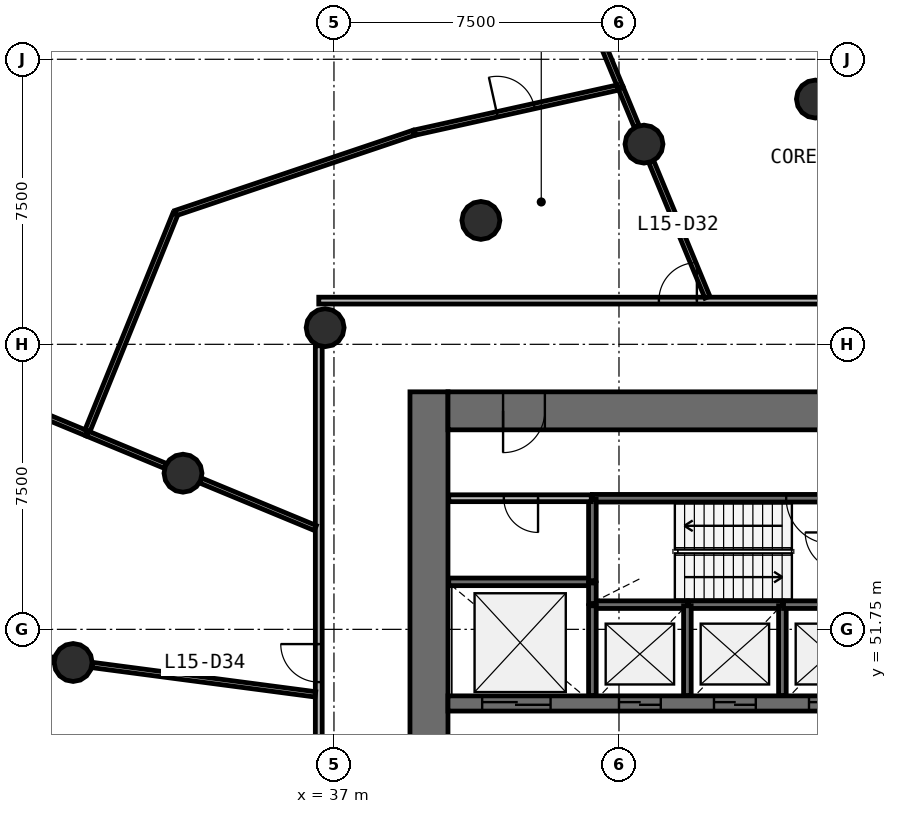
"""IFC4 building model, lengths in metres.
Left out: names, types, materials, properties, quantities, classifications, styles, units other than length and angle.
Written with IfcOpenShell. Run it as: python <this file> out.ifc"""

import sys

from ifc_helpers import new_model, si_unit, direction, frame, frame_2d, origin, origin_2d, place, context, subcontext, project, spatial, rectangle, circle, extrude, source, transform, mapped, element, fill, save


model = new_model("IFC4")
c1 = context("Model", 3, precision=1e-05, world=origin(), true_north=direction((0.0, 1.0)))
c2 = subcontext(c1, "Body", "Model", "MODEL_VIEW")
j1 = project(units=[si_unit("LENGTHUNIT", "METRE"), si_unit("PLANEANGLEUNIT", "RADIAN")], contexts=[c1])
p1 = place(None, origin())
s1 = spatial("IfcSite", under=j1, at=p1, CompositionType="ELEMENT")
p2 = place(p1, origin())
s2 = spatial("IfcBuilding", under=s1, at=p2, CompositionType="ELEMENT")
p3 = place(p2, frame((0.0, 0.0, 66.6)))
s3 = spatial("IfcBuildingStorey", under=s2, at=p3, CompositionType="ELEMENT", Elevation=66.6)
p4 = place(p3, frame((39.5, 58.0, 0.0), z_axis=(0.0, 0.0, 1.0), x_axis=(0.0, -1.0, 0.0)))
e1 = element("IfcWall", 1, at=p4, inside=s3, PredefinedType="SHEAR", context=c2, shape_type="SweptSolid", body=[
    extrude(rectangle(XDim=20.0, YDim=1.0, at=frame_2d((10.0, 0.0))), origin(), (0.0, 0.0, 1.0), 4.4),
])
p5 = place(p4, frame((9.1, 0.0, 0.0)))
e2 = element("IfcOpeningElement", 2, at=p5, cuts=e1, PredefinedType="OPENING", context=c2, shape_type="SweptSolid", body=[
    extrude(rectangle(XDim=1.8, YDim=2.1, at=frame_2d((0.9, 1.05))), frame((0.0, 0.51, 0.0), z_axis=(0.0, -1.0, 0.0), x_axis=(1.0, 0.0, 0.0)), (0.0, 0.0, 1.0), 1.02),
])
p6 = place(p3, frame((64.0, 57.5, 0.0), z_axis=(0.0, 0.0, 1.0), x_axis=(-1.0, 0.0, 0.0)))
e3 = element("IfcWall", 3, at=p6, inside=s3, PredefinedType="SHEAR", context=c2, shape_type="SweptSolid", body=[
    extrude(rectangle(XDim=24.0, YDim=1.0, at=frame_2d((12.0, 0.0))), origin(), (0.0, 0.0, 1.0), 4.4),
])
p7 = place(p6, frame((21.45, 0.0, 0.0)))
e4 = element("IfcOpeningElement", 4, at=p7, cuts=e3, PredefinedType="OPENING", context=c2, shape_type="SweptSolid", body=[
    extrude(rectangle(XDim=1.1, YDim=2.1, at=frame_2d((0.55, 1.05))), frame((0.0, 0.51, 0.0), z_axis=(0.0, -1.0, 0.0), x_axis=(1.0, 0.0, 0.0)), (0.0, 0.0, 1.0), 1.02),
])
p8 = place(p6, frame((1.95, 0.0, 0.0)))
e5 = element("IfcOpeningElement", 5, at=p8, cuts=e3, PredefinedType="OPENING", context=c2, shape_type="SweptSolid", body=[
    extrude(rectangle(XDim=1.1, YDim=2.1, at=frame_2d((0.55, 1.05))), frame((0.0, 0.51, 0.0), z_axis=(0.0, -1.0, 0.0), x_axis=(1.0, 0.0, 0.0)), (0.0, 0.0, 1.0), 1.02),
])
p9 = place(p3, frame((40.0, 49.8, 0.0), z_axis=(0.0, 0.0, 1.0), x_axis=(1.0, 0.0, 0.0)))
e6 = element("IfcWall", 6, at=p9, inside=s3, PredefinedType="SHEAR", context=c2, shape_type="SweptSolid", body=[
    extrude(rectangle(XDim=24.0, YDim=0.4, at=frame_2d((12.0, 0.0))), origin(), (0.0, 0.0, 1.0), 4.4),
])
p10 = place(p9, frame((4.5, 0.0, 0.0)))
e7 = element("IfcOpeningElement", 7, at=p10, cuts=e6, PredefinedType="OPENING", context=c2, shape_type="SweptSolid", body=[
    extrude(rectangle(XDim=1.1, YDim=2.1, at=frame_2d((0.55, 1.05))), frame((0.0, 0.21, 0.0), z_axis=(0.0, -1.0, 0.0), x_axis=(1.0, 0.0, 0.0)), (0.0, 0.0, 1.0), 0.42),
])
p11 = place(p9, frame((7.0, 0.0, 0.0)))
e8 = element("IfcOpeningElement", 8, at=p11, cuts=e6, PredefinedType="OPENING", context=c2, shape_type="SweptSolid", body=[
    extrude(rectangle(XDim=1.1, YDim=2.1, at=frame_2d((0.55, 1.05))), frame((0.0, 0.21, 0.0), z_axis=(0.0, -1.0, 0.0), x_axis=(1.0, 0.0, 0.0)), (0.0, 0.0, 1.0), 0.42),
])
p12 = place(p9, frame((9.5, 0.0, 0.0)))
e9 = element("IfcOpeningElement", 9, at=p12, cuts=e6, PredefinedType="OPENING", context=c2, shape_type="SweptSolid", body=[
    extrude(rectangle(XDim=1.1, YDim=2.1, at=frame_2d((0.55, 1.05))), frame((0.0, 0.21, 0.0), z_axis=(0.0, -1.0, 0.0), x_axis=(1.0, 0.0, 0.0)), (0.0, 0.0, 1.0), 0.42),
])
p13 = place(p9, frame((0.9, 0.0, 0.0)))
e10 = element("IfcOpeningElement", 10, at=p13, cuts=e6, PredefinedType="OPENING", context=c2, shape_type="SweptSolid", body=[
    extrude(rectangle(XDim=1.8, YDim=2.4, at=frame_2d((0.9, 1.2))), frame((0.0, 0.21, 0.0), z_axis=(0.0, -1.0, 0.0), x_axis=(1.0, 0.0, 0.0)), (0.0, 0.0, 1.0), 0.42),
])
p14 = place(p9, frame((20.45, 0.0, 0.0)))
e11 = element("IfcOpeningElement", 11, at=p14, cuts=e6, PredefinedType="OPENING", context=c2, shape_type="SweptSolid", body=[
    extrude(rectangle(XDim=0.9, YDim=2.1, at=frame_2d((0.45, 1.05))), frame((0.0, 0.21, 0.0), z_axis=(0.0, -1.0, 0.0), x_axis=(1.0, 0.0, 0.0)), (0.0, 0.0, 1.0), 0.42),
])
p15 = place(p9, frame((22.25, 0.0, 0.0)))
e12 = element("IfcOpeningElement", 12, at=p15, cuts=e6, PredefinedType="OPENING", context=c2, shape_type="SweptSolid", body=[
    extrude(rectangle(XDim=0.9, YDim=2.1, at=frame_2d((0.45, 1.05))), frame((0.0, 0.21, 0.0), z_axis=(0.0, -1.0, 0.0), x_axis=(1.0, 0.0, 0.0)), (0.0, 0.0, 1.0), 0.42),
])
p16 = place(p9, frame((11.65, 0.0, 0.0)))
e13 = element("IfcOpeningElement", 13, at=p16, cuts=e6, PredefinedType="OPENING", context=c2, shape_type="SweptSolid", body=[
    extrude(rectangle(XDim=0.9, YDim=2.1, at=frame_2d((0.45, 1.05))), frame((0.0, 0.21, 0.0), z_axis=(0.0, -1.0, 0.0), x_axis=(1.0, 0.0, 0.0)), (0.0, 0.0, 1.0), 0.42),
])
m1 = source(origin(), c2, "Body", "SweptSolid", [
    extrude(circle(Radius=0.5, at=origin_2d()), origin(), (0.0, 0.0, 1.0), 4.4),
])
for number, where, z_axis, x_axis in (
    (14, (49.669, 65.703, 0.0), (0.0, 0.0, 1.0), (1.0, 0.0, 0.0)),
    (15, (45.158, 64.518, 0.0), (0.0, 0.0, 1.0), (1.0, 0.0, 0.0)),
    (16, (40.866, 62.51, 0.0), (0.0, 0.0, 1.0), (1.0, 0.0, 0.0)),
    (17, (36.768, 59.688, 0.0), (0.0, 0.0, 1.0), (1.0, 0.0, 0.0)),
    (18, (33.028, 55.859, 0.0), (0.0, 0.0, 1.0), (1.0, 0.0, 0.0)),
    (19, (30.137, 50.878, 0.0), (0.0, 0.0, 1.0), (1.0, 0.0, 0.0)),
):
    element("IfcColumn", number, at=place(p3, frame(where, z_axis=z_axis, x_axis=x_axis)), inside=s3, PredefinedType="COLUMN", context=c2, shape_type="MappedRepresentation", body=[
        mapped(m1, transform((0.0, 0.0, 0.0), scale=1.0)),
    ])
p17 = place(p3, frame((50.4, 55.2, 0.0), z_axis=(0.0, 0.0, 1.0), x_axis=(-1.0, 0.0, 0.0)))
e20 = element("IfcWall", 20, at=p17, inside=s3, PredefinedType="SOLIDWALL", context=c2, shape_type="SweptSolid", body=[
    extrude(rectangle(XDim=6.6, YDim=0.2, at=frame_2d((3.3, 0.0))), origin(), (0.0, 0.0, 1.0), 3.95),
])
p18 = place(p17, frame((0.3, 0.0, 0.0)))
e21 = element("IfcOpeningElement", 21, at=p18, cuts=e20, PredefinedType="OPENING", context=c2, shape_type="SweptSolid", body=[
    extrude(rectangle(XDim=1.2, YDim=2.1, at=frame_2d((0.6, 1.05))), frame((0.0, 0.11, 0.0), z_axis=(0.0, -1.0, 0.0), x_axis=(1.0, 0.0, 0.0)), (0.0, 0.0, 1.0), 0.22),
])
p19 = place(p3, frame((43.8, 53.0, 0.0), z_axis=(0.0, 0.0, 1.0), x_axis=(-1.0, 0.0, 0.0)))
e22 = element("IfcWall", 22, at=p19, inside=s3, PredefinedType="SOLIDWALL", context=c2, shape_type="SweptSolid", body=[
    extrude(rectangle(XDim=3.78, YDim=0.2, at=frame_2d((1.89, 0.0))), origin(), (0.0, 0.0, 1.0), 3.95),
])
p20 = place(p3, frame((46.3, 52.4, 0.0), z_axis=(0.0, 0.0, 1.0), x_axis=(-1.0, 0.0, 0.0)))
e23 = element("IfcWall", 23, at=p20, inside=s3, PredefinedType="SOLIDWALL", context=c2, shape_type="SweptSolid", body=[
    extrude(rectangle(XDim=2.5, YDim=0.2, at=frame_2d((1.25, 0.0))), origin(), (0.0, 0.0, 1.0), 3.95),
])
p21 = place(p3, frame((48.8, 52.4, 0.0), z_axis=(0.0, 0.0, 1.0), x_axis=(-1.0, 0.0, 0.0)))
e24 = element("IfcWall", 24, at=p21, inside=s3, PredefinedType="SOLIDWALL", context=c2, shape_type="SweptSolid", body=[
    extrude(rectangle(XDim=2.47, YDim=0.2, at=frame_2d((1.235, 0.0))), origin(), (0.0, 0.0, 1.0), 3.95),
])
for number, where, z_axis, x_axis in (
    (25, (43.8, 52.37, 0.0), (0.0, 0.0, 1.0), (0.0, -1.0, 0.0)),
    (26, (46.3, 50.01, 0.0), (0.0, 0.0, 1.0), (0.0, 1.0, 0.0)),
    (27, (48.8, 50.01, 0.0), (0.0, 0.0, 1.0), (0.0, 1.0, 0.0)),
):
    element("IfcWall", number, at=place(p3, frame(where, z_axis=z_axis, x_axis=x_axis)), inside=s3, PredefinedType="SOLIDWALL", context=c2, shape_type="SweptSolid", body=[
        extrude(rectangle(XDim=2.36, YDim=0.2, at=frame_2d((1.18, 0.0))), origin(), (0.0, 0.0, 1.0), 3.95),
    ])
p22 = place(p3, frame((43.8, 55.17, 0.0), z_axis=(0.0, 0.0, 1.0), x_axis=(0.0, -1.0, 0.0)))
e28 = element("IfcWall", 28, at=p22, inside=s3, PredefinedType="SOLIDWALL", context=c2, shape_type="SweptSolid", body=[
    extrude(rectangle(XDim=2.14, YDim=0.2, at=frame_2d((1.07, 0.0))), origin(), (0.0, 0.0, 1.0), 3.95),
])
p23 = place(p3, frame((50.37, 52.4, 0.0), z_axis=(0.0, 0.0, 1.0), x_axis=(-1.0, 0.0, 0.0)))
e29 = element("IfcWall", 29, at=p23, inside=s3, PredefinedType="SOLIDWALL", context=c2, shape_type="SweptSolid", body=[
    extrude(rectangle(XDim=1.54, YDim=0.2, at=frame_2d((0.77, 0.0))), origin(), (0.0, 0.0, 1.0), 3.95),
])
p24 = place(p3, frame((43.8, 52.43, 0.0), z_axis=(0.0, 0.0, 1.0), x_axis=(0.0, 1.0, 0.0)))
e30 = element("IfcWall", 30, at=p24, inside=s3, PredefinedType="SOLIDWALL", context=c2, shape_type="SweptSolid", body=[
    extrude(rectangle(XDim=0.54, YDim=0.2, at=frame_2d((0.27, 0.0))), origin(), (0.0, 0.0, 1.0), 3.95),
])
p25 = place(p3, frame((36.6, 60.4, 0.0), z_axis=(0.0, 0.0, 1.0), x_axis=(1.0, 0.0, 0.0)))
e31 = element("IfcWall", 31, at=p25, inside=s3, PredefinedType="PARTITIONING", context=c2, shape_type="SweptSolid", body=[
    extrude(rectangle(XDim=30.8, YDim=0.18, at=frame_2d((15.4, 0.0))), origin(), (0.0, 0.0, 1.0), 3.05),
])
p26 = place(p25, frame((17.35, 0.0, 0.0)))
e32 = element("IfcOpeningElement", 32, at=p26, cuts=e31, PredefinedType="OPENING", context=c2, shape_type="SweptSolid", body=[
    extrude(rectangle(XDim=1.0, YDim=2.1, at=frame_2d((0.5, 1.05))), frame((0.0, 0.1, 0.0), z_axis=(0.0, -1.0, 0.0), x_axis=(1.0, 0.0, 0.0)), (0.0, 0.0, 1.0), 0.2),
])
p27 = place(p25, frame((14.95, 0.0, 0.0)))
e33 = element("IfcOpeningElement", 33, at=p27, cuts=e31, PredefinedType="OPENING", context=c2, shape_type="SweptSolid", body=[
    extrude(rectangle(XDim=1.0, YDim=2.1, at=frame_2d((0.5, 1.05))), frame((0.0, 0.1, 0.0), z_axis=(0.0, -1.0, 0.0), x_axis=(1.0, 0.0, 0.0)), (0.0, 0.0, 1.0), 0.2),
])
p28 = place(p25, frame((8.95, 0.0, 0.0)))
e34 = element("IfcOpeningElement", 34, at=p28, cuts=e31, PredefinedType="OPENING", context=c2, shape_type="SweptSolid", body=[
    extrude(rectangle(XDim=1.0, YDim=2.1, at=frame_2d((0.5, 1.05))), frame((0.0, 0.1, 0.0), z_axis=(0.0, -1.0, 0.0), x_axis=(1.0, 0.0, 0.0)), (0.0, 0.0, 1.0), 0.2),
])
p29 = place(p3, frame((36.6, 35.63, 0.0), z_axis=(0.0, 0.0, 1.0), x_axis=(0.0, 1.0, 0.0)))
e35 = element("IfcWall", 35, at=p29, inside=s3, PredefinedType="PARTITIONING", context=c2, shape_type="SweptSolid", body=[
    extrude(rectangle(XDim=23.583, YDim=0.18, at=frame_2d((11.791, 0.0))), origin(), (0.0, 0.0, 1.0), 3.05),
])
p30 = place(p29, frame((14.732, 0.0, 0.0)))
e36 = element("IfcOpeningElement", 36, at=p30, cuts=e35, PredefinedType="OPENING", context=c2, shape_type="SweptSolid", body=[
    extrude(rectangle(XDim=1.0, YDim=2.1, at=frame_2d((0.5, 1.05))), frame((0.0, 0.1, 0.0), z_axis=(0.0, -1.0, 0.0), x_axis=(1.0, 0.0, 0.0)), (0.0, 0.0, 1.0), 0.2),
])
p31 = place(p29, frame((11.333, 0.0, 0.0)))
e37 = element("IfcOpeningElement", 37, at=p31, cuts=e35, PredefinedType="OPENING", context=c2, shape_type="SweptSolid", body=[
    extrude(rectangle(XDim=1.0, YDim=2.1, at=frame_2d((0.5, 1.05))), frame((0.0, 0.1, 0.0), z_axis=(0.0, -1.0, 0.0), x_axis=(1.0, 0.0, 0.0)), (0.0, 0.0, 1.0), 0.2),
])
p32 = place(p29, frame((9.133, 0.0, 0.0)))
e38 = element("IfcOpeningElement", 38, at=p32, cuts=e35, PredefinedType="OPENING", context=c2, shape_type="SweptSolid", body=[
    extrude(rectangle(XDim=1.0, YDim=2.1, at=frame_2d((0.5, 1.05))), frame((0.0, 0.1, 0.0), z_axis=(0.0, -1.0, 0.0), x_axis=(1.0, 0.0, 0.0)), (0.0, 0.0, 1.0), 0.2),
])
p33 = place(p3, frame((43.77, 55.2, 0.0), z_axis=(0.0, 0.0, 1.0), x_axis=(-1.0, 0.0, 0.0)))
e39 = element("IfcWall", 39, at=p33, inside=s3, PredefinedType="PARTITIONING", context=c2, shape_type="SweptSolid", body=[
    extrude(rectangle(XDim=3.75, YDim=0.18, at=frame_2d((1.875, 0.0))), origin(), (0.0, 0.0, 1.0), 3.95),
])
p34 = place(p33, frame((1.4, 0.0, 0.0)))
e40 = element("IfcOpeningElement", 40, at=p34, cuts=e39, PredefinedType="OPENING", context=c2, shape_type="SweptSolid", body=[
    extrude(rectangle(XDim=0.9, YDim=2.1, at=frame_2d((0.45, 1.05))), frame((0.0, 0.1, 0.0), z_axis=(0.0, -1.0, 0.0), x_axis=(1.0, 0.0, 0.0)), (0.0, 0.0, 1.0), 0.2),
])
p35 = place(p3, frame((29.637, 50.944, 0.0), z_axis=(0.0, 0.0, 1.0), x_axis=(-0.991443306772, 0.130538000051, 0.0)))
e41 = element("IfcWall", 41, at=p35, inside=s3, PredefinedType="PARTITIONING", context=c2, shape_type="SweptSolid", body=[
    extrude(rectangle(XDim=11.195, YDim=0.14, at=frame_2d((5.598, 0.0))), origin(), (0.0, 0.0, 1.0), 3.05),
])
p36 = place(p3, frame((30.487, 56.911, 0.0), z_axis=(0.0, 0.0, 1.0), x_axis=(-0.923876068888, 0.382691794185, 0.0)))
e42 = element("IfcWall", 42, at=p36, inside=s3, PredefinedType="PARTITIONING", context=c2, shape_type="SweptSolid", body=[
    extrude(rectangle(XDim=8.096, YDim=0.14, at=frame_2d((4.048, 0.0))), origin(), (0.0, 0.0, 1.0), 3.05),
])
p37 = place(p3, frame((44.536, 66.021, 0.0), z_axis=(0.0, 0.0, 1.0), x_axis=(-0.382675586032, 0.92388278253, 0.0)))
e43 = element("IfcWall", 43, at=p37, inside=s3, PredefinedType="PARTITIONING", context=c2, shape_type="SweptSolid", body=[
    extrude(rectangle(XDim=7.725, YDim=0.14, at=frame_2d((3.862, 0.0))), origin(), (0.0, 0.0, 1.0), 3.05),
])
p38 = place(p3, frame((39.098, 64.815, 0.0), z_axis=(0.0, 0.0, 1.0), x_axis=(-0.947628643264, -0.319374317166, 0.0)))
e44 = element("IfcWall", 44, at=p38, inside=s3, PredefinedType="PARTITIONING", context=c2, shape_type="SweptSolid", body=[
    extrude(rectangle(XDim=6.607, YDim=0.14, at=frame_2d((3.303, 0.0))), origin(), (0.0, 0.0, 1.0), 3.05),
])
p39 = place(p3, frame((32.825, 62.677, 0.0), z_axis=(0.0, 0.0, 1.0), x_axis=(-0.375902233723, -0.926659328277, 0.0)))
e45 = element("IfcWall", 45, at=p39, inside=s3, PredefinedType="PARTITIONING", context=c2, shape_type="SweptSolid", body=[
    extrude(rectangle(XDim=6.152, YDim=0.14, at=frame_2d((3.076, 0.0))), origin(), (0.0, 0.0, 1.0), 3.05),
])
p40 = place(p3, frame((36.51, 50.039, 0.0), z_axis=(0.0, 0.0, 1.0), x_axis=(-0.991445034615, 0.130524876315, 0.0)))
e46 = element("IfcWall", 46, at=p40, inside=s3, PredefinedType="PARTITIONING", context=c2, shape_type="SweptSolid", body=[
    extrude(rectangle(XDim=5.924, YDim=0.14, at=frame_2d((2.962, 0.0))), origin(), (0.0, 0.0, 1.0), 3.05),
])
p41 = place(p3, frame((39.127, 64.821, 0.0), z_axis=(0.0, 0.0, 1.0), x_axis=(0.976281499716, 0.216505042232, 0.0)))
e47 = element("IfcWall", 47, at=p41, inside=s3, PredefinedType="PARTITIONING", context=c2, shape_type="SweptSolid", body=[
    extrude(rectangle(XDim=5.469, YDim=0.14, at=frame_2d((2.734, 0.0))), origin(), (0.0, 0.0, 1.0), 3.05),
])
p42 = place(p41, frame((2.219, 0.0, 0.0)))
e48 = element("IfcOpeningElement", 48, at=p42, cuts=e47, PredefinedType="OPENING", context=c2, shape_type="SweptSolid", body=[
    extrude(rectangle(XDim=1.0, YDim=2.1, at=frame_2d((0.5, 1.05))), frame((0.0, 0.08, 0.0), z_axis=(0.0, -1.0, 0.0), x_axis=(1.0, 0.0, 0.0)), (0.0, 0.0, 1.0), 0.16),
])
p43 = place(p3, frame((46.826, 60.49, 0.0), z_axis=(0.0, 0.0, 1.0), x_axis=(-0.382644558062, 0.923895633817, 0.0)))
e49 = element("IfcWall", 49, at=p43, inside=s3, PredefinedType="PARTITIONING", context=c2, shape_type="SweptSolid", body=[
    extrude(rectangle(XDim=3.854, YDim=0.14, at=frame_2d((1.927, 0.0))), origin(), (0.0, 0.0, 1.0), 3.05),
])
p44 = place(p3, frame((36.51, 54.416, 0.0), z_axis=(0.0, 0.0, 1.0), x_axis=(-0.923911109142, 0.382607190737, 0.0)))
e50 = element("IfcWall", 50, at=p44, inside=s3, PredefinedType="PARTITIONING", context=c2, shape_type="SweptSolid", body=[
    extrude(rectangle(XDim=3.264, YDim=0.14, at=frame_2d((1.632, 0.0))), origin(), (0.0, 0.0, 1.0), 3.05),
])
p45 = place(p3, frame((32.561, 56.052, 0.0), z_axis=(0.0, 0.0, 1.0), x_axis=(-0.923877119512, 0.382689257808, 0.0)))
e51 = element("IfcWall", 51, at=p45, inside=s3, PredefinedType="PARTITIONING", context=c2, shape_type="SweptSolid", body=[
    extrude(rectangle(XDim=2.215, YDim=0.14, at=frame_2d((1.107, 0.0))), origin(), (0.0, 0.0, 1.0), 3.05),
])
p46 = place(p3, frame((44.965, 64.984, 0.0), z_axis=(0.0, 0.0, 1.0), x_axis=(-0.382773041214, 0.923842410219, 0.0)))
e52 = element("IfcWall", 52, at=p46, inside=s3, PredefinedType="PARTITIONING", context=c2, shape_type="SweptSolid", body=[
    extrude(rectangle(XDim=1.092, YDim=0.14, at=frame_2d((0.546, 0.0))), origin(), (0.0, 0.0, 1.0), 3.05),
])
m2 = source(origin(), c2, "Body", "SweptSolid", [
    extrude(rectangle(XDim=1.1, YDim=2.1, at=frame_2d((0.55, 1.05))), frame((0.0, 0.025, 0.0), z_axis=(0.0, -1.0, 0.0), x_axis=(1.0, 0.0, 0.0)), (0.0, 0.0, 1.0), 0.05),
])
p47 = place(p10, origin())
e53 = element("IfcDoor", 53, at=p47, inside=s3, OperationType="DOUBLE_DOOR_SLIDING", PredefinedType="USERDEFINED", context=c2, shape_type="MappedRepresentation", body=[
    mapped(m2, transform((0.0, 0.0, 0.0), scale=1.0)),
])
fill(e7, e53)
p48 = place(p11, origin())
e54 = element("IfcDoor", 54, at=p48, inside=s3, OperationType="DOUBLE_DOOR_SLIDING", PredefinedType="USERDEFINED", context=c2, shape_type="MappedRepresentation", body=[
    mapped(m2, transform((0.0, 0.0, 0.0), scale=1.0)),
])
fill(e8, e54)
p49 = place(p12, origin())
e55 = element("IfcDoor", 55, at=p49, inside=s3, OperationType="DOUBLE_DOOR_SLIDING", PredefinedType="USERDEFINED", context=c2, shape_type="MappedRepresentation", body=[
    mapped(m2, transform((0.0, 0.0, 0.0), scale=1.0)),
])
fill(e9, e55)
m3 = source(origin(), c2, "Body", "SweptSolid", [
    extrude(rectangle(XDim=1.8, YDim=2.4, at=frame_2d((0.9, 1.2))), frame((0.0, 0.025, 0.0), z_axis=(0.0, -1.0, 0.0), x_axis=(1.0, 0.0, 0.0)), (0.0, 0.0, 1.0), 0.05),
])
p50 = place(p13, origin())
e56 = element("IfcDoor", 56, at=p50, inside=s3, OperationType="DOUBLE_DOOR_SLIDING", PredefinedType="USERDEFINED", context=c2, shape_type="MappedRepresentation", body=[
    mapped(m3, transform((0.0, 0.0, 0.0), scale=1.0)),
])
fill(e10, e56)
m4 = source(origin(), c2, "Body", "SweptSolid", [
    extrude(rectangle(XDim=1.2, YDim=2.1, at=frame_2d((0.6, 1.05))), frame((0.0, 0.025, 0.0), z_axis=(0.0, -1.0, 0.0), x_axis=(1.0, 0.0, 0.0)), (0.0, 0.0, 1.0), 0.05),
])
p51 = place(p18, origin())
e57 = element("IfcDoor", 57, at=p51, inside=s3, OperationType="SINGLE_SWING_LEFT", PredefinedType="DOOR", context=c2, shape_type="MappedRepresentation", body=[
    mapped(m4, transform((0.0, 0.0, 0.0), scale=1.0)),
])
fill(e21, e57)
m5 = source(origin(), c2, "Body", "SweptSolid", [
    extrude(rectangle(XDim=1.1, YDim=2.1, at=frame_2d((0.55, 1.05))), frame((0.0, 0.025, 0.0), z_axis=(0.0, -1.0, 0.0), x_axis=(1.0, 0.0, 0.0)), (0.0, 0.0, 1.0), 0.05),
])
p52 = place(p7, origin())
e58 = element("IfcDoor", 58, at=p52, inside=s3, OperationType="SINGLE_SWING_RIGHT", PredefinedType="DOOR", context=c2, shape_type="MappedRepresentation", body=[
    mapped(m5, transform((0.0, 0.0, 0.0), scale=1.0)),
])
fill(e4, e58)
m6 = source(origin(), c2, "Body", "SweptSolid", [
    extrude(rectangle(XDim=1.0, YDim=2.1, at=frame_2d((0.5, 1.05))), frame((0.0, 0.025, 0.0), z_axis=(0.0, -1.0, 0.0), x_axis=(1.0, 0.0, 0.0)), (0.0, 0.0, 1.0), 0.05),
])
p53 = place(p28, origin())
e59 = element("IfcDoor", 59, at=p53, inside=s3, OperationType="SINGLE_SWING_RIGHT", PredefinedType="DOOR", context=c2, shape_type="MappedRepresentation", body=[
    mapped(m6, transform((0.0, 0.0, 0.0), scale=1.0)),
])
fill(e34, e59)
p54 = place(p42, origin())
e60 = element("IfcDoor", 60, at=p54, inside=s3, OperationType="SINGLE_SWING_LEFT", PredefinedType="DOOR", context=c2, shape_type="MappedRepresentation", body=[
    mapped(m6, transform((0.0, 0.0, 0.0), scale=1.0)),
])
fill(e48, e60)
p55 = place(p30, origin())
e61 = element("IfcDoor", 61, at=p55, inside=s3, OperationType="SINGLE_SWING_RIGHT", PredefinedType="DOOR", context=c2, shape_type="MappedRepresentation", body=[
    mapped(m6, transform((0.0, 0.0, 0.0), scale=1.0)),
])
fill(e36, e61)
m7 = source(origin(), c2, "Body", "SweptSolid", [
    extrude(rectangle(XDim=0.9, YDim=2.1, at=frame_2d((0.45, 1.05))), frame((0.0, 0.025, 0.0), z_axis=(0.0, -1.0, 0.0), x_axis=(1.0, 0.0, 0.0)), (0.0, 0.0, 1.0), 0.05),
])
p56 = place(p34, origin())
e62 = element("IfcDoor", 62, at=p56, inside=s3, OperationType="SINGLE_SWING_LEFT", PredefinedType="DOOR", context=c2, shape_type="MappedRepresentation", body=[
    mapped(m7, transform((0.0, 0.0, 0.0), scale=1.0)),
])
fill(e40, e62)
save(model, sys.argv[1])
